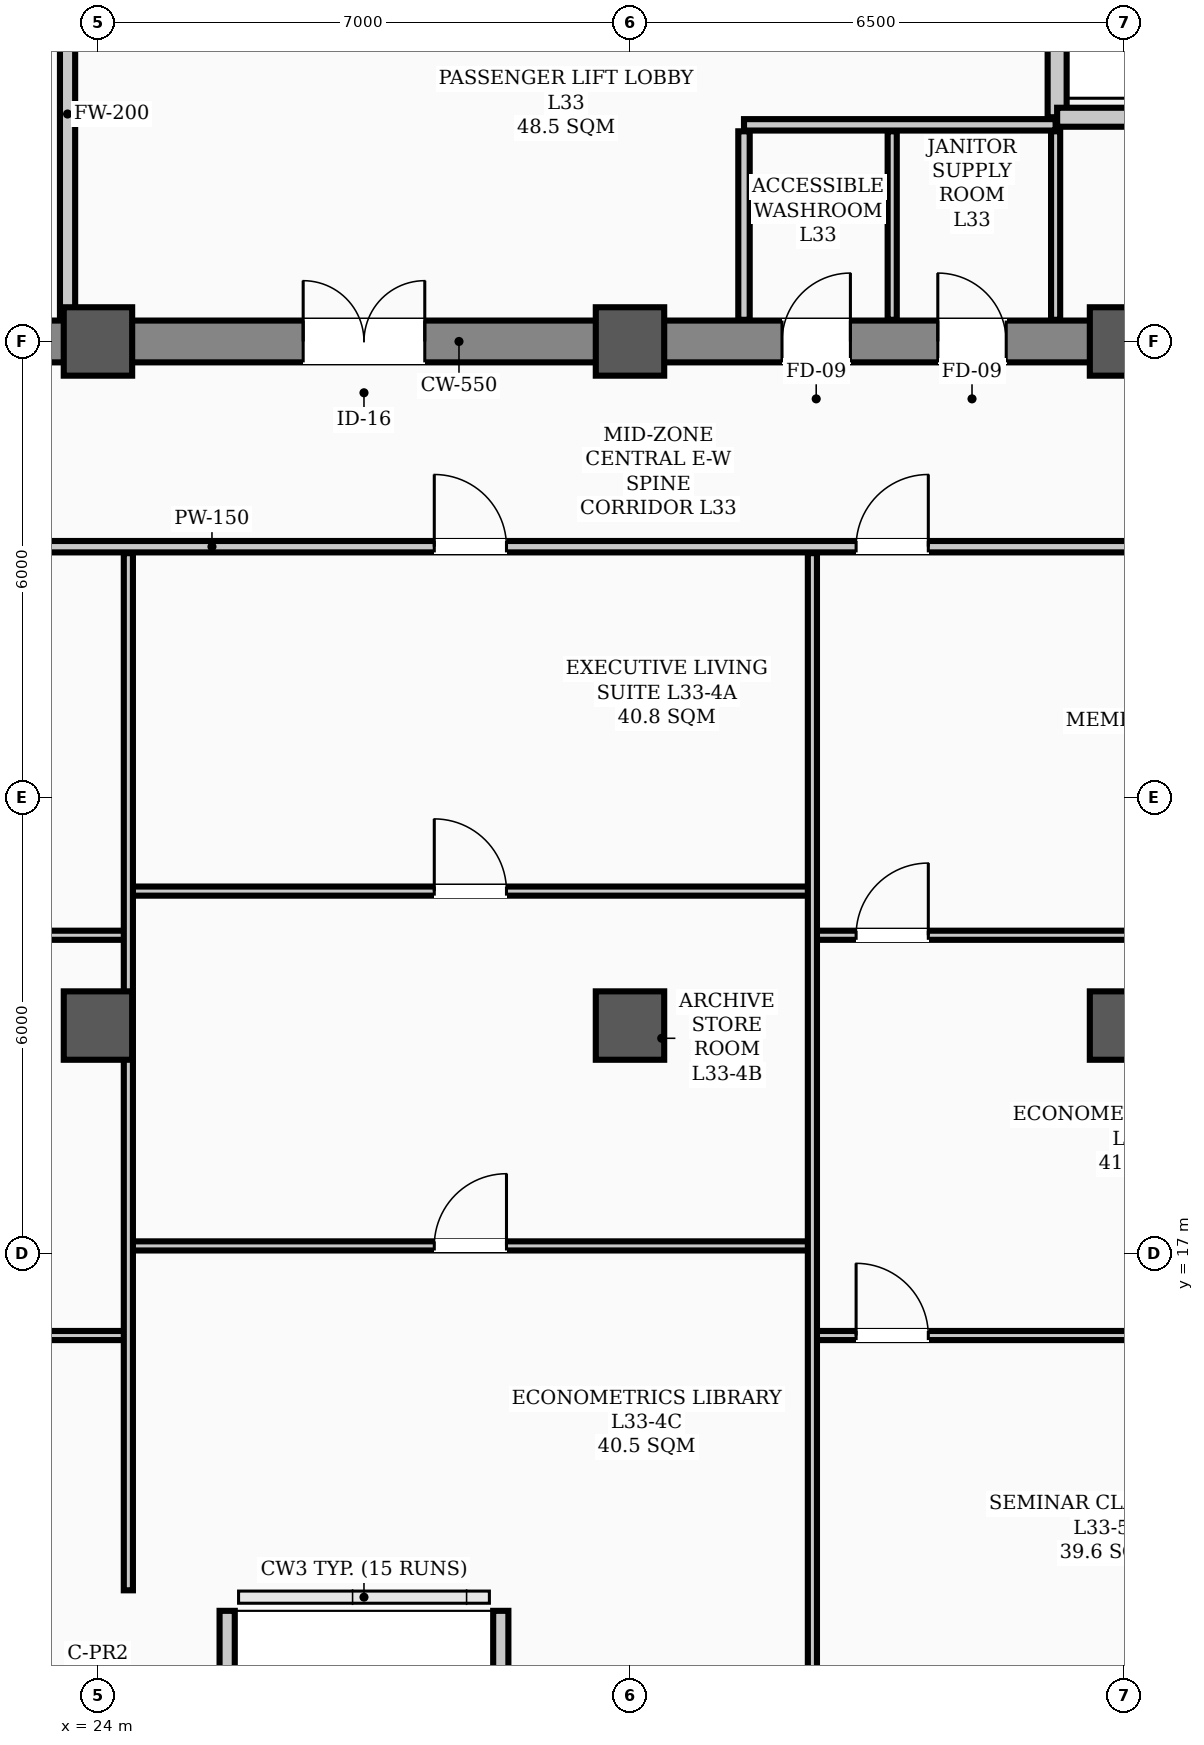
"""IFC4 building model, lengths in metres.
Left out: names, types, materials, properties, quantities, classifications, styles, units other than length and angle.
Written with IfcOpenShell. Run it as: python <this file> out.ifc"""

import sys

from ifc_helpers import new_model, si_unit, direction, frame, frame_2d, origin, origin_2d, place, context, subcontext, project, spatial, rectangle, hollow_rectangle, extrude, element, fill, save


model = new_model("IFC4")
c1 = context("Model", 3, precision=1e-05, world=origin(), true_north=direction((0.0, 1.0)))
c2 = subcontext(c1, "Body", "Model", "MODEL_VIEW")
j1 = project(units=[si_unit("LENGTHUNIT", "METRE"), si_unit("PLANEANGLEUNIT", "RADIAN")], contexts=[c1])
p1 = place(None, origin())
s1 = spatial("IfcSite", under=j1, at=p1, CompositionType="ELEMENT")
p2 = place(p1, origin())
s2 = spatial("IfcBuilding", under=s1, at=p2, CompositionType="ELEMENT")
p3 = place(p2, frame((0.0, 0.0, 134.4)))
s3 = spatial("IfcBuildingStorey", under=s2, at=p3, CompositionType="ELEMENT", Elevation=134.4)
for number, where, z_axis, x_axis in (
    (1, (24.0, 29.0, 0.0), (0.0, 0.0, 1.0), (1.0, 0.0, 0.0)),
    (2, (31.0, 29.0, 0.0), (0.0, 0.0, 1.0), (1.0, 0.0, 0.0)),
    (3, (37.5, 29.0, 0.0), (0.0, 0.0, 1.0), (1.0, 0.0, 0.0)),
    (4, (24.0, 20.0, 0.0), (0.0, 0.0, 1.0), (1.0, 0.0, 0.0)),
    (5, (31.0, 20.0, 0.0), (0.0, 0.0, 1.0), (1.0, 0.0, 0.0)),
    (6, (37.5, 20.0, 0.0), (0.0, 0.0, 1.0), (1.0, 0.0, 0.0)),
):
    element("IfcColumn", number, at=place(p3, frame(where, z_axis=z_axis, x_axis=x_axis)), inside=s3, PredefinedType="COLUMN", context=c2, shape_type="SweptSolid", body=[
        extrude(hollow_rectangle(XDim=0.9, YDim=0.9, WallThickness=0.035, InnerFilletRadius=0.017, OuterFilletRadius=0.052, at=origin_2d()), origin(), (0.0, 0.0, 1.0), 3.9),
    ])
for number, where, z_axis, x_axis in (
    (7, (25.7, 10.6, 0.0), (0.0, 0.0, 1.0), (0.0, 1.0, 0.0)),
    (8, (29.3, 12.3, 0.0), (0.0, 0.0, 1.0), (0.0, -1.0, 0.0)),
):
    element("IfcWall", number, at=place(p3, frame(where, z_axis=z_axis, x_axis=x_axis)), inside=s3, PredefinedType="PARAPET", context=c2, shape_type="SweptSolid", body=[
        extrude(rectangle(XDim=1.7, YDim=0.2, at=frame_2d((0.85, 0.0))), origin(), (0.0, 0.0, 1.0), 1.2),
    ])
p4 = place(p3, frame((13.5, 29.0, 0.0), z_axis=(0.0, 0.0, 1.0), x_axis=(1.0, 0.0, 0.0)))
e9 = element("IfcWall", 9, at=p4, inside=s3, PredefinedType="SHEAR", context=c2, shape_type="SweptSolid", body=[
    extrude(rectangle(XDim=30.5, YDim=0.55, at=frame_2d((15.25, 0.0))), origin(), (0.0, 0.0, 1.0), 3.72),
])
p5 = place(p4, frame((1.75, 0.0, 0.0)))
e10 = element("IfcOpeningElement", 10, at=p5, cuts=e9, PredefinedType="OPENING", context=c2, shape_type="SweptSolid", body=[
    extrude(rectangle(XDim=1.1, YDim=2.08, at=frame_2d((0.55, 1.04))), frame((0.0, 0.285, 0.0), z_axis=(0.0, -1.0, 0.0), x_axis=(1.0, 0.0, 0.0)), (0.0, 0.0, 1.0), 0.57),
])
p6 = place(p4, frame((26.7, 0.0, 0.0)))
e11 = element("IfcOpeningElement", 11, at=p6, cuts=e9, PredefinedType="OPENING", context=c2, shape_type="SweptSolid", body=[
    extrude(rectangle(XDim=1.1, YDim=2.08, at=frame_2d((0.55, 1.04))), frame((0.0, 0.285, 0.0), z_axis=(0.0, -1.0, 0.0), x_axis=(1.0, 0.0, 0.0)), (0.0, 0.0, 1.0), 0.57),
])
p7 = place(p4, frame((6.8, 0.0, 0.0)))
e12 = element("IfcOpeningElement", 12, at=p7, cuts=e9, PredefinedType="OPENING", context=c2, shape_type="SweptSolid", body=[
    extrude(rectangle(XDim=1.1, YDim=2.08, at=frame_2d((0.55, 1.04))), frame((0.0, 0.285, 0.0), z_axis=(0.0, -1.0, 0.0), x_axis=(1.0, 0.0, 0.0)), (0.0, 0.0, 1.0), 0.57),
])
p8 = place(p4, frame((13.2, 0.0, 0.0)))
e13 = element("IfcOpeningElement", 13, at=p8, cuts=e9, PredefinedType="OPENING", context=c2, shape_type="SweptSolid", body=[
    extrude(rectangle(XDim=1.6, YDim=2.08, at=frame_2d((0.8, 1.04))), frame((0.0, 0.285, 0.0), z_axis=(0.0, -1.0, 0.0), x_axis=(1.0, 0.0, 0.0)), (0.0, 0.0, 1.0), 0.57),
])
p9 = place(p4, frame((19.5, 0.0, 0.0)))
e14 = element("IfcOpeningElement", 14, at=p9, cuts=e9, PredefinedType="OPENING", context=c2, shape_type="SweptSolid", body=[
    extrude(rectangle(XDim=0.9, YDim=2.08, at=frame_2d((0.45, 1.04))), frame((0.0, 0.285, 0.0), z_axis=(0.0, -1.0, 0.0), x_axis=(1.0, 0.0, 0.0)), (0.0, 0.0, 1.0), 0.57),
])
p10 = place(p4, frame((21.55, 0.0, 0.0)))
e15 = element("IfcOpeningElement", 15, at=p10, cuts=e9, PredefinedType="OPENING", context=c2, shape_type="SweptSolid", body=[
    extrude(rectangle(XDim=0.9, YDim=2.08, at=frame_2d((0.45, 1.04))), frame((0.0, 0.285, 0.0), z_axis=(0.0, -1.0, 0.0), x_axis=(1.0, 0.0, 0.0)), (0.0, 0.0, 1.0), 0.57),
])
p11 = place(p3, frame((36.62, 31.95, 0.0), z_axis=(0.0, 0.0, 1.0), x_axis=(0.0, 1.0, 0.0)))
e16 = element("IfcWall", 16, at=p11, inside=s3, PredefinedType="STANDARD", context=c2, shape_type="SweptSolid", body=[
    extrude(rectangle(XDim=6.0, YDim=0.25, at=frame_2d((3.0, 0.0))), origin(), (0.0, 0.0, 1.0), 3.72),
])
p12 = place(p11, frame((0.9, 0.0, 0.0)))
e17 = element("IfcOpeningElement", 17, at=p12, cuts=e16, PredefinedType="OPENING", context=c2, shape_type="SweptSolid", body=[
    extrude(rectangle(XDim=1.1, YDim=2.08, at=frame_2d((0.55, 1.04))), frame((0.0, 0.135, 0.0), z_axis=(0.0, -1.0, 0.0), x_axis=(1.0, 0.0, 0.0)), (0.0, 0.0, 1.0), 0.27),
])
p13 = place(p11, frame((4.0, 0.0, 0.0)))
e18 = element("IfcOpeningElement", 18, at=p13, cuts=e16, PredefinedType="OPENING", context=c2, shape_type="SweptSolid", body=[
    extrude(rectangle(XDim=1.1, YDim=2.08, at=frame_2d((0.55, 1.04))), frame((0.0, 0.135, 0.0), z_axis=(0.0, -1.0, 0.0), x_axis=(1.0, 0.0, 0.0)), (0.0, 0.0, 1.0), 0.27),
])
p14 = place(p3, frame((36.62, 31.95, 0.0), z_axis=(0.0, 0.0, 1.0), x_axis=(1.0, 0.0, 0.0)))
e19 = element("IfcWall", 19, at=p14, inside=s3, PredefinedType="STANDARD", context=c2, shape_type="SweptSolid", body=[
    extrude(rectangle(XDim=1.9, YDim=0.25, at=frame_2d((0.95, 0.0))), origin(), (0.0, 0.0, 1.0), 3.48),
])
p15 = place(p3, frame((32.5, 31.85, 0.0), z_axis=(0.0, 0.0, 1.0), x_axis=(1.0, 0.0, 0.0)))
e20 = element("IfcWall", 20, at=p15, inside=s3, PredefinedType="PARTITIONING", context=c2, shape_type="SweptSolid", body=[
    extrude(rectangle(XDim=4.1, YDim=0.15, at=frame_2d((2.05, 0.0))), origin(), (0.0, 0.0, 1.0), 3.72),
])
p16 = place(p3, frame((2.31, 26.3, 0.0), z_axis=(0.0, 0.0, 1.0), x_axis=(1.0, 0.0, 0.0)))
e21 = element("IfcWall", 21, at=p16, inside=s3, PredefinedType="PARTITIONING", context=c2, shape_type="SweptSolid", body=[
    extrude(rectangle(XDim=46.38, YDim=0.15, at=frame_2d((23.19, 0.0))), origin(), (0.0, 0.0, 1.0), 3.1),
])
p17 = place(p16, frame((12.515, 0.0, 0.0)))
e22 = element("IfcOpeningElement", 22, at=p17, cuts=e21, PredefinedType="OPENING", context=c2, shape_type="SweptSolid", body=[
    extrude(rectangle(XDim=0.95, YDim=2.08, at=frame_2d((0.475, 1.04))), frame((0.0, 0.085, 0.0), z_axis=(0.0, -1.0, 0.0), x_axis=(1.0, 0.0, 0.0)), (0.0, 0.0, 1.0), 0.17),
])
p18 = place(p16, frame((18.615, 0.0, 0.0)))
e23 = element("IfcOpeningElement", 23, at=p18, cuts=e21, PredefinedType="OPENING", context=c2, shape_type="SweptSolid", body=[
    extrude(rectangle(XDim=0.95, YDim=2.08, at=frame_2d((0.475, 1.04))), frame((0.0, 0.085, 0.0), z_axis=(0.0, -1.0, 0.0), x_axis=(1.0, 0.0, 0.0)), (0.0, 0.0, 1.0), 0.17),
])
p19 = place(p16, frame((26.115, 0.0, 0.0)))
e24 = element("IfcOpeningElement", 24, at=p19, cuts=e21, PredefinedType="OPENING", context=c2, shape_type="SweptSolid", body=[
    extrude(rectangle(XDim=0.95, YDim=2.08, at=frame_2d((0.475, 1.04))), frame((0.0, 0.085, 0.0), z_axis=(0.0, -1.0, 0.0), x_axis=(1.0, 0.0, 0.0)), (0.0, 0.0, 1.0), 0.17),
])
p20 = place(p16, frame((31.665, 0.0, 0.0)))
e25 = element("IfcOpeningElement", 25, at=p20, cuts=e21, PredefinedType="OPENING", context=c2, shape_type="SweptSolid", body=[
    extrude(rectangle(XDim=0.95, YDim=2.08, at=frame_2d((0.475, 1.04))), frame((0.0, 0.085, 0.0), z_axis=(0.0, -1.0, 0.0), x_axis=(1.0, 0.0, 0.0)), (0.0, 0.0, 1.0), 0.17),
])
p21 = place(p16, frame((43.06, 0.0, 0.0)))
e26 = element("IfcOpeningElement", 26, at=p21, cuts=e21, PredefinedType="OPENING", context=c2, shape_type="SweptSolid", body=[
    extrude(rectangle(XDim=0.95, YDim=2.08, at=frame_2d((0.475, 1.04))), frame((0.0, 0.085, 0.0), z_axis=(0.0, -1.0, 0.0), x_axis=(1.0, 0.0, 0.0)), (0.0, 0.0, 1.0), 0.17),
])
p22 = place(p3, frame((18.4, 21.188, 0.0), z_axis=(0.0, 0.0, 1.0), x_axis=(1.0, 0.0, 0.0)))
e27 = element("IfcWall", 27, at=p22, inside=s3, PredefinedType="PARTITIONING", context=c2, shape_type="SweptSolid", body=[
    extrude(rectangle(XDim=6.0, YDim=0.12, at=frame_2d((3.0, 0.0))), origin(), (0.0, 0.0, 1.0), 3.1),
])
p23 = place(p22, frame((2.525, 0.0, 0.0)))
e28 = element("IfcOpeningElement", 28, at=p23, cuts=e27, PredefinedType="OPENING", context=c2, shape_type="SweptSolid", body=[
    extrude(rectangle(XDim=0.95, YDim=2.08, at=frame_2d((0.475, 1.04))), frame((0.0, 0.07, 0.0), z_axis=(0.0, -1.0, 0.0), x_axis=(1.0, 0.0, 0.0)), (0.0, 0.0, 1.0), 0.14),
])
p24 = place(p3, frame((18.4, 15.922, 0.0), z_axis=(0.0, 0.0, 1.0), x_axis=(1.0, 0.0, 0.0)))
e29 = element("IfcWall", 29, at=p24, inside=s3, PredefinedType="PARTITIONING", context=c2, shape_type="SweptSolid", body=[
    extrude(rectangle(XDim=6.0, YDim=0.12, at=frame_2d((3.0, 0.0))), origin(), (0.0, 0.0, 1.0), 3.1),
])
p25 = place(p24, frame((2.525, 0.0, 0.0)))
e30 = element("IfcOpeningElement", 30, at=p25, cuts=e29, PredefinedType="OPENING", context=c2, shape_type="SweptSolid", body=[
    extrude(rectangle(XDim=0.95, YDim=2.08, at=frame_2d((0.475, 1.04))), frame((0.0, 0.07, 0.0), z_axis=(0.0, -1.0, 0.0), x_axis=(1.0, 0.0, 0.0)), (0.0, 0.0, 1.0), 0.14),
])
p26 = place(p3, frame((24.4, 21.769, 0.0), z_axis=(0.0, 0.0, 1.0), x_axis=(1.0, 0.0, 0.0)))
e31 = element("IfcWall", 31, at=p26, inside=s3, PredefinedType="PARTITIONING", context=c2, shape_type="SweptSolid", body=[
    extrude(rectangle(XDim=9.0, YDim=0.12, at=frame_2d((4.5, 0.0))), origin(), (0.0, 0.0, 1.0), 3.1),
])
p27 = place(p26, frame((4.025, 0.0, 0.0)))
e32 = element("IfcOpeningElement", 32, at=p27, cuts=e31, PredefinedType="OPENING", context=c2, shape_type="SweptSolid", body=[
    extrude(rectangle(XDim=0.95, YDim=2.08, at=frame_2d((0.475, 1.04))), frame((0.0, 0.07, 0.0), z_axis=(0.0, -1.0, 0.0), x_axis=(1.0, 0.0, 0.0)), (0.0, 0.0, 1.0), 0.14),
])
p28 = place(p3, frame((24.4, 17.101, 0.0), z_axis=(0.0, 0.0, 1.0), x_axis=(1.0, 0.0, 0.0)))
e33 = element("IfcWall", 33, at=p28, inside=s3, PredefinedType="PARTITIONING", context=c2, shape_type="SweptSolid", body=[
    extrude(rectangle(XDim=9.0, YDim=0.12, at=frame_2d((4.5, 0.0))), origin(), (0.0, 0.0, 1.0), 3.1),
])
p29 = place(p28, frame((4.025, 0.0, 0.0)))
e34 = element("IfcOpeningElement", 34, at=p29, cuts=e33, PredefinedType="OPENING", context=c2, shape_type="SweptSolid", body=[
    extrude(rectangle(XDim=0.95, YDim=2.08, at=frame_2d((0.475, 1.04))), frame((0.0, 0.07, 0.0), z_axis=(0.0, -1.0, 0.0), x_axis=(1.0, 0.0, 0.0)), (0.0, 0.0, 1.0), 0.14),
])
p30 = place(p3, frame((33.4, 21.188, 0.0), z_axis=(0.0, 0.0, 1.0), x_axis=(1.0, 0.0, 0.0)))
e35 = element("IfcWall", 35, at=p30, inside=s3, PredefinedType="PARTITIONING", context=c2, shape_type="SweptSolid", body=[
    extrude(rectangle(XDim=7.8, YDim=0.12, at=frame_2d((3.9, 0.0))), origin(), (0.0, 0.0, 1.0), 3.1),
])
p31 = place(p30, frame((0.575, 0.0, 0.0)))
e36 = element("IfcOpeningElement", 36, at=p31, cuts=e35, PredefinedType="OPENING", context=c2, shape_type="SweptSolid", body=[
    extrude(rectangle(XDim=0.95, YDim=2.08, at=frame_2d((0.475, 1.04))), frame((0.0, 0.07, 0.0), z_axis=(0.0, -1.0, 0.0), x_axis=(1.0, 0.0, 0.0)), (0.0, 0.0, 1.0), 0.14),
])
p32 = place(p3, frame((33.4, 15.922, 0.0), z_axis=(0.0, 0.0, 1.0), x_axis=(1.0, 0.0, 0.0)))
e37 = element("IfcWall", 37, at=p32, inside=s3, PredefinedType="PARTITIONING", context=c2, shape_type="SweptSolid", body=[
    extrude(rectangle(XDim=7.8, YDim=0.12, at=frame_2d((3.9, 0.0))), origin(), (0.0, 0.0, 1.0), 3.1),
])
p33 = place(p32, frame((0.575, 0.0, 0.0)))
e38 = element("IfcOpeningElement", 38, at=p33, cuts=e37, PredefinedType="OPENING", context=c2, shape_type="SweptSolid", body=[
    extrude(rectangle(XDim=0.95, YDim=2.08, at=frame_2d((0.475, 1.04))), frame((0.0, 0.07, 0.0), z_axis=(0.0, -1.0, 0.0), x_axis=(1.0, 0.0, 0.0)), (0.0, 0.0, 1.0), 0.14),
])
p34 = place(p3, frame((23.6, 29.285, 0.0), z_axis=(0.0, 0.0, 1.0), x_axis=(0.0, 1.0, 0.0)))
e39 = element("IfcWall", 39, at=p34, inside=s3, PredefinedType="STANDARD", context=c2, shape_type="SweptSolid", body=[
    extrude(rectangle(XDim=5.415, YDim=0.2, at=frame_2d((2.708, 0.0))), origin(), (0.0, 0.0, 1.0), 3.1),
])
p35 = place(p3, frame((32.5, 29.285, 0.0), z_axis=(0.0, 0.0, 1.0), x_axis=(0.0, 1.0, 0.0)))
e40 = element("IfcWall", 40, at=p35, inside=s3, PredefinedType="PARTITIONING", context=c2, shape_type="SweptSolid", body=[
    extrude(rectangle(XDim=2.48, YDim=0.15, at=frame_2d((1.24, 0.0))), origin(), (0.0, 0.0, 1.0), 3.3),
])
for number, where, z_axis, x_axis in (
    (41, (36.6, 29.285, 0.0), (0.0, 0.0, 1.0), (0.0, 1.0, 0.0)),
    (42, (34.45, 29.285, 0.0), (0.0, 0.0, 1.0), (0.0, 1.0, 0.0)),
):
    element("IfcWall", number, at=place(p3, frame(where, z_axis=z_axis, x_axis=x_axis)), inside=s3, PredefinedType="PARTITIONING", context=c2, shape_type="SweptSolid", body=[
        extrude(rectangle(XDim=2.48, YDim=0.12, at=frame_2d((1.24, 0.0))), origin(), (0.0, 0.0, 1.0), 3.3),
    ])
p36 = place(p3, frame((24.4, 12.57, 0.0), z_axis=(0.0, 0.0, 1.0), x_axis=(0.0, 1.0, 0.0)))
e43 = element("IfcWall", 43, at=p36, inside=s3, PredefinedType="PARTITIONING", context=c2, shape_type="SweptSolid", body=[
    extrude(rectangle(XDim=13.645, YDim=0.12, at=frame_2d((6.823, 0.0))), origin(), (0.0, 0.0, 1.0), 3.0),
])
p37 = place(p3, frame((33.4, 10.81, 0.0), z_axis=(0.0, 0.0, 1.0), x_axis=(0.0, 1.0, 0.0)))
e44 = element("IfcWall", 44, at=p37, inside=s3, PredefinedType="PARTITIONING", context=c2, shape_type="SweptSolid", body=[
    extrude(rectangle(XDim=15.405, YDim=0.12, at=frame_2d((7.703, 0.0))), origin(), (0.0, 0.0, 1.0), 3.0),
])
p38 = place(p8, origin())
e45 = element("IfcDoor", 45, at=p38, inside=s3, OperationType="DOUBLE_DOOR_SINGLE_SWING", PredefinedType="DOOR", context=c2, shape_type="SweptSolid", body=[
    extrude(rectangle(XDim=1.6, YDim=2.08, at=frame_2d((0.8, 1.04))), frame((0.0, 0.025, 0.0), z_axis=(0.0, -1.0, 0.0), x_axis=(1.0, 0.0, 0.0)), (0.0, 0.0, 1.0), 0.05),
])
fill(e13, e45)
p39 = place(p9, origin())
e46 = element("IfcDoor", 46, at=p39, inside=s3, OperationType="SINGLE_SWING_RIGHT", PredefinedType="DOOR", context=c2, shape_type="SweptSolid", body=[
    extrude(rectangle(XDim=0.9, YDim=2.08, at=frame_2d((0.45, 1.04))), frame((0.0, 0.025, 0.0), z_axis=(0.0, -1.0, 0.0), x_axis=(1.0, 0.0, 0.0)), (0.0, 0.0, 1.0), 0.05),
])
fill(e14, e46)
p40 = place(p10, origin())
e47 = element("IfcDoor", 47, at=p40, inside=s3, OperationType="SINGLE_SWING_LEFT", PredefinedType="DOOR", context=c2, shape_type="SweptSolid", body=[
    extrude(rectangle(XDim=0.9, YDim=2.08, at=frame_2d((0.45, 1.04))), frame((0.0, 0.025, 0.0), z_axis=(0.0, -1.0, 0.0), x_axis=(1.0, 0.0, 0.0)), (0.0, 0.0, 1.0), 0.05),
])
fill(e15, e47)
p41 = place(p27, origin())
e48 = element("IfcDoor", 48, at=p41, inside=s3, OperationType="SINGLE_SWING_LEFT", PredefinedType="DOOR", context=c2, shape_type="SweptSolid", body=[
    extrude(rectangle(XDim=0.95, YDim=2.08, at=frame_2d((0.475, 1.04))), frame((0.0, 0.025, 0.0), z_axis=(0.0, -1.0, 0.0), x_axis=(1.0, 0.0, 0.0)), (0.0, 0.0, 1.0), 0.05),
])
fill(e32, e48)
p42 = place(p29, origin())
e49 = element("IfcDoor", 49, at=p42, inside=s3, OperationType="SINGLE_SWING_RIGHT", PredefinedType="DOOR", context=c2, shape_type="SweptSolid", body=[
    extrude(rectangle(XDim=0.95, YDim=2.08, at=frame_2d((0.475, 1.04))), frame((0.0, 0.025, 0.0), z_axis=(0.0, -1.0, 0.0), x_axis=(1.0, 0.0, 0.0)), (0.0, 0.0, 1.0), 0.05),
])
fill(e34, e49)
p43 = place(p19, origin())
e50 = element("IfcDoor", 50, at=p43, inside=s3, OperationType="SINGLE_SWING_LEFT", PredefinedType="DOOR", context=c2, shape_type="SweptSolid", body=[
    extrude(rectangle(XDim=0.95, YDim=2.08, at=frame_2d((0.475, 1.04))), frame((0.0, 0.025, 0.0), z_axis=(0.0, -1.0, 0.0), x_axis=(1.0, 0.0, 0.0)), (0.0, 0.0, 1.0), 0.05),
])
fill(e24, e50)
p44 = place(p31, origin())
e51 = element("IfcDoor", 51, at=p44, inside=s3, OperationType="SINGLE_SWING_RIGHT", PredefinedType="DOOR", context=c2, shape_type="SweptSolid", body=[
    extrude(rectangle(XDim=0.95, YDim=2.08, at=frame_2d((0.475, 1.04))), frame((0.0, 0.025, 0.0), z_axis=(0.0, -1.0, 0.0), x_axis=(1.0, 0.0, 0.0)), (0.0, 0.0, 1.0), 0.05),
])
fill(e36, e51)
p45 = place(p33, origin())
e52 = element("IfcDoor", 52, at=p45, inside=s3, OperationType="SINGLE_SWING_LEFT", PredefinedType="DOOR", context=c2, shape_type="SweptSolid", body=[
    extrude(rectangle(XDim=0.95, YDim=2.08, at=frame_2d((0.475, 1.04))), frame((0.0, 0.025, 0.0), z_axis=(0.0, -1.0, 0.0), x_axis=(1.0, 0.0, 0.0)), (0.0, 0.0, 1.0), 0.05),
])
fill(e38, e52)
p46 = place(p20, origin())
e53 = element("IfcDoor", 53, at=p46, inside=s3, OperationType="SINGLE_SWING_RIGHT", PredefinedType="DOOR", context=c2, shape_type="SweptSolid", body=[
    extrude(rectangle(XDim=0.95, YDim=2.08, at=frame_2d((0.475, 1.04))), frame((0.0, 0.025, 0.0), z_axis=(0.0, -1.0, 0.0), x_axis=(1.0, 0.0, 0.0)), (0.0, 0.0, 1.0), 0.05),
])
fill(e25, e53)
save(model, sys.argv[1])
